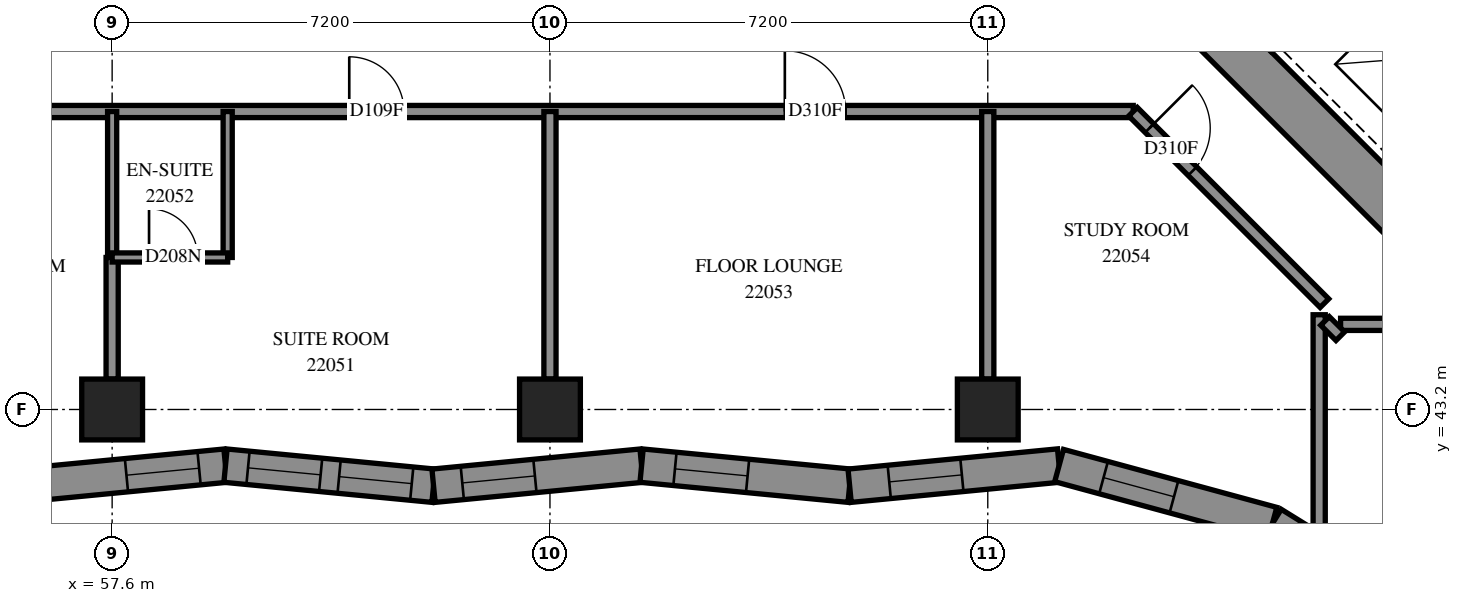
"""IFC4 building model, lengths in metres.
Left out: names, types, materials, properties, quantities, classifications, styles, units other than length and angle.
Written with IfcOpenShell. Run it as: python <this file> out.ifc"""

import sys

from ifc_helpers import new_model, si_unit, direction, frame, frame_2d, origin, origin_2d, place, context, subcontext, project, spatial, polyline, rectangle, outline, extrude, element, fill, save


model = new_model("IFC4")
c1 = context("Model", 3, precision=1e-05, world=origin(), true_north=direction((0.0, 1.0)))
c2 = subcontext(c1, "Body", "Model", "MODEL_VIEW")
j1 = project(units=[si_unit("LENGTHUNIT", "METRE"), si_unit("PLANEANGLEUNIT", "RADIAN")], contexts=[c1])
p1 = place(None, origin())
s1 = spatial("IfcSite", under=j1, at=p1, CompositionType="ELEMENT")
p2 = place(p1, origin())
s2 = spatial("IfcBuilding", under=s1, at=p2, CompositionType="ELEMENT")
p3 = place(p2, frame((0.0, 0.0, 84.6)))
s3 = spatial("IfcBuildingStorey", under=s2, at=p3, CompositionType="ELEMENT", Elevation=84.6)
for number, where, z_axis, x_axis in (
    (1, (57.6, 43.2, 0.0), (0.0, 0.0, 1.0), (1.0, 0.0, 0.0)),
    (2, (64.8, 43.2, 0.0), (0.0, 0.0, 1.0), (1.0, 0.0, 0.0)),
    (3, (72.0, 43.2, 0.0), (0.0, 0.0, 1.0), (1.0, 0.0, 0.0)),
):
    element("IfcColumn", number, at=place(p3, frame(where, z_axis=z_axis, x_axis=x_axis)), inside=s3, PredefinedType="COLUMN", context=c2, shape_type="SweptSolid", body=[
        extrude(rectangle(XDim=1.0, YDim=1.0, at=origin_2d()), origin(), (0.0, 0.0, 1.0), 3.1),
    ])
p4 = place(p3, frame((75.806, 49.373, -0.3), z_axis=(0.0, 0.0, 1.0), x_axis=(0.7071067812, -0.7071067812, 0.0)))
e4 = element("IfcWall", 4, at=p4, inside=s3, PredefinedType="SHEAR", context=c2, shape_type="SweptSolid", body=[
    extrude(rectangle(XDim=16.0, YDim=0.8, at=frame_2d((8.0, 0.0))), origin(), (0.0, 0.0, 1.0), 2.7),
])
p5 = place(p3, frame((56.043, 41.946, 0.0), z_axis=(0.0, 0.0, 1.0), x_axis=(0.995380467, 0.096008989, 0.0)))
e5 = element("IfcWall", 5, at=p5, inside=s3, PredefinedType="SOLIDWALL", context=c2, shape_type="SweptSolid", body=[
    extrude(outline(polyline([(-0.026, -0.275), (3.411, -0.275), (3.464, 0.275), (0.026, 0.275), (-0.026, -0.275)])), origin(), (0.0, 0.0, 1.0), 3.1),
])
p6 = place(p5, frame((1.801, 0.0, 0.5)))
e6 = element("IfcOpeningElement", 6, at=p6, cuts=e5, PredefinedType="OPENING", context=c2, shape_type="SweptSolid", body=[
    extrude(rectangle(XDim=1.2, YDim=2.45, at=frame_2d((0.6, 1.225))), frame((0.0, 0.285, 0.0), z_axis=(0.0, -1.0, 0.0), x_axis=(1.0, 0.0, 0.0)), (0.0, 0.0, 1.0), 0.57),
])
p7 = place(p3, frame((59.464, 42.276, 0.0), z_axis=(0.0, 0.0, 1.0), x_axis=(0.995380467, -0.096008989, 0.0)))
e7 = element("IfcWall", 7, at=p7, inside=s3, PredefinedType="SOLIDWALL", context=c2, shape_type="SweptSolid", body=[
    extrude(outline(polyline([(0.026, -0.275), (3.464, -0.275), (3.411, 0.275), (-0.026, 0.275), (0.026, -0.275)])), origin(), (0.0, 0.0, 1.0), 3.1),
])
p8 = place(p7, frame((0.372, 0.0, 0.5)))
e8 = element("IfcOpeningElement", 8, at=p8, cuts=e7, PredefinedType="OPENING", context=c2, shape_type="SweptSolid", body=[
    extrude(rectangle(XDim=1.2, YDim=2.45, at=frame_2d((0.6, 1.225))), frame((0.0, 0.285, 0.0), z_axis=(0.0, -1.0, 0.0), x_axis=(1.0, 0.0, 0.0)), (0.0, 0.0, 1.0), 0.57),
])
p9 = place(p7, frame((1.877, 0.0, 0.5)))
e9 = element("IfcOpeningElement", 9, at=p9, cuts=e7, PredefinedType="OPENING", context=c2, shape_type="SweptSolid", body=[
    extrude(rectangle(XDim=1.2, YDim=2.45, at=frame_2d((0.6, 1.225))), frame((0.0, 0.285, 0.0), z_axis=(0.0, -1.0, 0.0), x_axis=(1.0, 0.0, 0.0)), (0.0, 0.0, 1.0), 0.57),
])
p10 = place(p3, frame((62.885, 41.946, 0.0), z_axis=(0.0, 0.0, 1.0), x_axis=(0.9953807351, 0.0960062087, 0.0)))
e10 = element("IfcWall", 10, at=p10, inside=s3, PredefinedType="SOLIDWALL", context=c2, shape_type="SweptSolid", body=[
    extrude(outline(polyline([(-0.026, -0.275), (3.411, -0.275), (3.464, 0.275), (0.026, 0.275), (-0.026, -0.275)])), origin(), (0.0, 0.0, 1.0), 3.1),
])
p11 = place(p10, frame((0.475, 0.0, 0.5)))
e11 = element("IfcOpeningElement", 11, at=p11, cuts=e10, PredefinedType="OPENING", context=c2, shape_type="SweptSolid", body=[
    extrude(rectangle(XDim=1.2, YDim=2.45, at=frame_2d((0.6, 1.225))), frame((0.0, 0.285, 0.0), z_axis=(0.0, -1.0, 0.0), x_axis=(1.0, 0.0, 0.0)), (0.0, 0.0, 1.0), 0.57),
])
p12 = place(p3, frame((66.307, 42.276, 0.0), z_axis=(0.0, 0.0, 1.0), x_axis=(0.995380467, -0.096008989, 0.0)))
e12 = element("IfcWall", 12, at=p12, inside=s3, PredefinedType="SOLIDWALL", context=c2, shape_type="SweptSolid", body=[
    extrude(outline(polyline([(0.026, -0.275), (3.464, -0.275), (3.411, 0.275), (-0.026, 0.275), (0.026, -0.275)])), origin(), (0.0, 0.0, 1.0), 3.1),
])
p13 = place(p12, frame((0.551, 0.0, 0.5)))
e13 = element("IfcOpeningElement", 13, at=p13, cuts=e12, PredefinedType="OPENING", context=c2, shape_type="SweptSolid", body=[
    extrude(rectangle(XDim=1.2, YDim=2.45, at=frame_2d((0.6, 1.225))), frame((0.0, 0.285, 0.0), z_axis=(0.0, -1.0, 0.0), x_axis=(1.0, 0.0, 0.0)), (0.0, 0.0, 1.0), 0.57),
])
p14 = place(p3, frame((69.728, 41.946, 0.0), z_axis=(0.0, 0.0, 1.0), x_axis=(0.9953800797, 0.0960130045, 0.0)))
e14 = element("IfcWall", 14, at=p14, inside=s3, PredefinedType="SOLIDWALL", context=c2, shape_type="SweptSolid", body=[
    extrude(outline(polyline([(-0.026, -0.275), (3.411, -0.275), (3.511, 0.275), (0.026, 0.275), (-0.026, -0.275)])), origin(), (0.0, 0.0, 1.0), 3.1),
])
p15 = place(p14, frame((0.654, 0.0, 0.5)))
e15 = element("IfcOpeningElement", 15, at=p15, cuts=e14, PredefinedType="OPENING", context=c2, shape_type="SweptSolid", body=[
    extrude(rectangle(XDim=1.2, YDim=2.45, at=frame_2d((0.6, 1.225))), frame((0.0, 0.285, 0.0), z_axis=(0.0, -1.0, 0.0), x_axis=(1.0, 0.0, 0.0)), (0.0, 0.0, 1.0), 0.57),
])
p16 = place(p3, frame((73.173, 42.279, 0.0), z_axis=(0.0, 0.0, 1.0), x_axis=(0.9649824686, -0.2623143827, 0.0)))
e16 = element("IfcWall", 16, at=p16, inside=s3, PredefinedType="SOLIDWALL", context=c2, shape_type="SweptSolid", body=[
    extrude(outline(polyline([(0.05, -0.275), (3.596, -0.275), (3.676, 0.275), (-0.05, 0.275), (0.05, -0.275)])), origin(), (0.0, 0.0, 1.0), 3.1),
])
p17 = place(p16, frame((0.757, 0.0, 0.5)))
e17 = element("IfcOpeningElement", 17, at=p17, cuts=e16, PredefinedType="OPENING", context=c2, shape_type="SweptSolid", body=[
    extrude(rectangle(XDim=1.2, YDim=2.45, at=frame_2d((0.6, 1.225))), frame((0.0, 0.285, 0.0), z_axis=(0.0, -1.0, 0.0), x_axis=(1.0, 0.0, 0.0)), (0.0, 0.0, 1.0), 0.57),
])
p18 = place(p3, frame((76.681, 41.325, 0.0), z_axis=(0.0, 0.0, 1.0), x_axis=(0.8503819746, -0.5261658458, 0.0)))
e18 = element("IfcWall", 18, at=p18, inside=s3, PredefinedType="SOLIDWALL", context=c2, shape_type="SweptSolid", body=[
    extrude(outline(polyline([(0.04, -0.275), (4.097, -0.275), (4.184, 0.275), (-0.04, 0.275), (0.04, -0.275)])), origin(), (0.0, 0.0, 1.0), 3.1),
])
p19 = place(p18, frame((0.368, 0.0, 0.5)))
e19 = element("IfcOpeningElement", 19, at=p19, cuts=e18, PredefinedType="OPENING", context=c2, shape_type="SweptSolid", body=[
    extrude(rectangle(XDim=1.2, YDim=2.45, at=frame_2d((0.6, 1.225))), frame((0.0, 0.285, 0.0), z_axis=(0.0, -1.0, 0.0), x_axis=(1.0, 0.0, 0.0)), (0.0, 0.0, 1.0), 0.57),
])
p20 = place(p18, frame((2.238, 0.0, 0.5)))
e20 = element("IfcOpeningElement", 20, at=p20, cuts=e18, PredefinedType="OPENING", context=c2, shape_type="SweptSolid", body=[
    extrude(rectangle(XDim=1.2, YDim=2.45, at=frame_2d((0.6, 1.225))), frame((0.0, 0.285, 0.0), z_axis=(0.0, -1.0, 0.0), x_axis=(1.0, 0.0, 0.0)), (0.0, 0.0, 1.0), 0.57),
])
p21 = place(p3, frame((55.3, 48.1, 0.0), z_axis=(0.0, 0.0, 1.0), x_axis=(1.0, 0.0, 0.0)))
e21 = element("IfcWall", 21, at=p21, inside=s3, PredefinedType="PARTITIONING", context=c2, shape_type="SweptSolid", body=[
    extrude(rectangle(XDim=19.092, YDim=0.2, at=frame_2d((9.546, 0.0))), origin(), (0.0, 0.0, 1.0), 3.1),
])
p22 = place(p21, frame((6.199, 0.0, 0.0)))
e22 = element("IfcOpeningElement", 22, at=p22, cuts=e21, PredefinedType="OPENING", context=c2, shape_type="SweptSolid", body=[
    extrude(rectangle(XDim=0.9, YDim=2.1, at=frame_2d((0.45, 1.05))), frame((0.0, 0.11, 0.0), z_axis=(0.0, -1.0, 0.0), x_axis=(1.0, 0.0, 0.0)), (0.0, 0.0, 1.0), 0.22),
])
p23 = place(p21, frame((13.363, 0.0, 0.0)))
e23 = element("IfcOpeningElement", 23, at=p23, cuts=e21, PredefinedType="OPENING", context=c2, shape_type="SweptSolid", body=[
    extrude(rectangle(XDim=1.0, YDim=2.1, at=frame_2d((0.5, 1.05))), frame((0.0, 0.11, 0.0), z_axis=(0.0, -1.0, 0.0), x_axis=(1.0, 0.0, 0.0)), (0.0, 0.0, 1.0), 0.22),
])
p24 = place(p3, frame((74.388, 48.096, 0.0), z_axis=(0.0, 0.0, 1.0), x_axis=(0.7071067812, -0.7071067812, 0.0)))
e24 = element("IfcWall", 24, at=p24, inside=s3, PredefinedType="PARTITIONING", context=c2, shape_type="SweptSolid", body=[
    extrude(rectangle(XDim=4.452, YDim=0.2, at=frame_2d((2.226, 0.0))), origin(), (0.0, 0.0, 1.0), 3.1),
])
p25 = place(p24, frame((0.382, 0.0, 0.0)))
e25 = element("IfcOpeningElement", 25, at=p25, cuts=e24, PredefinedType="OPENING", context=c2, shape_type="SweptSolid", body=[
    extrude(rectangle(XDim=1.0, YDim=2.1, at=frame_2d((0.5, 1.05))), frame((0.0, 0.11, 0.0), z_axis=(0.0, -1.0, 0.0), x_axis=(1.0, 0.0, 0.0)), (0.0, 0.0, 1.0), 0.22),
])
for number, where, z_axis, x_axis in (
    (26, (64.8, 43.7, 0.0), (0.0, 0.0, 1.0), (0.0, 1.0, 0.0)),
    (27, (72.0, 43.7, 0.0), (0.0, 0.0, 1.0), (0.0, 1.0, 0.0)),
):
    element("IfcWall", number, at=place(p3, frame(where, z_axis=z_axis, x_axis=x_axis)), inside=s3, PredefinedType="PARTITIONING", context=c2, shape_type="SweptSolid", body=[
        extrude(rectangle(XDim=4.4, YDim=0.2, at=frame_2d((2.2, 0.0))), origin(), (0.0, 0.0, 1.0), 3.1),
    ])
p26 = place(p3, frame((77.45, 41.173, 0.0), z_axis=(0.0, 0.0, 1.0), x_axis=(0.0, 1.0, 0.0)))
e28 = element("IfcWall", 28, at=p26, inside=s3, PredefinedType="PARTITIONING", context=c2, shape_type="SweptSolid", body=[
    extrude(rectangle(XDim=3.585, YDim=0.2, at=frame_2d((1.793, 0.0))), origin(), (0.0, 0.0, 1.0), 3.1),
])
for number, where, z_axis, x_axis in (
    (29, (59.5, 45.7, 0.0), (0.0, 0.0, 1.0), (0.0, 1.0, 0.0)),
    (30, (57.6, 45.7, 0.0), (0.0, 0.0, 1.0), (0.0, 1.0, 0.0)),
):
    element("IfcWall", number, at=place(p3, frame(where, z_axis=z_axis, x_axis=x_axis)), inside=s3, PredefinedType="PARTITIONING", context=c2, shape_type="SweptSolid", body=[
        extrude(rectangle(XDim=2.4, YDim=0.15, at=frame_2d((1.2, 0.0))), origin(), (0.0, 0.0, 1.0), 3.1),
    ])
p27 = place(p3, frame((77.802, 44.6, 0.0), z_axis=(0.0, 0.0, 1.0), x_axis=(1.0, 0.0, 0.0)))
e31 = element("IfcWall", 31, at=p27, inside=s3, PredefinedType="PARTITIONING", context=c2, shape_type="SweptSolid", body=[
    extrude(rectangle(XDim=2.098, YDim=0.2, at=frame_2d((1.049, 0.0))), origin(), (0.0, 0.0, 1.0), 3.1),
])
p28 = place(p3, frame((57.6, 43.7, 0.0), z_axis=(0.0, 0.0, 1.0), x_axis=(0.0, 1.0, 0.0)))
e32 = element("IfcWall", 32, at=p28, inside=s3, PredefinedType="PARTITIONING", context=c2, shape_type="SweptSolid", body=[
    extrude(rectangle(XDim=2.0, YDim=0.2, at=frame_2d((1.0, 0.0))), origin(), (0.0, 0.0, 1.0), 3.1),
])
p29 = place(p3, frame((57.6, 45.7, 0.0), z_axis=(0.0, 0.0, 1.0), x_axis=(1.0, 0.0, 0.0)))
e33 = element("IfcWall", 33, at=p29, inside=s3, PredefinedType="PARTITIONING", context=c2, shape_type="SweptSolid", body=[
    extrude(rectangle(XDim=1.9, YDim=0.15, at=frame_2d((0.95, 0.0))), origin(), (0.0, 0.0, 1.0), 3.1),
])
p30 = place(p29, frame((0.607, 0.0, 0.0)))
e34 = element("IfcOpeningElement", 34, at=p30, cuts=e33, PredefinedType="OPENING", context=c2, shape_type="SweptSolid", body=[
    extrude(rectangle(XDim=0.8, YDim=2.1, at=frame_2d((0.4, 1.05))), frame((0.0, 0.085, 0.0), z_axis=(0.0, -1.0, 0.0), x_axis=(1.0, 0.0, 0.0)), (0.0, 0.0, 1.0), 0.17),
])
p31 = place(p3, frame((78.357, 40.612, 0.0), z_axis=(0.0, 0.0, 1.0), x_axis=(0.7071489323, 0.7070646275, 0.0)))
e35 = element("IfcWall", 35, at=p31, inside=s3, PredefinedType="PARTITIONING", context=c2, shape_type="SweptSolid", body=[
    extrude(rectangle(XDim=1.186, YDim=0.2, at=frame_2d((0.593, 0.0))), origin(), (0.0, 0.0, 1.0), 3.1),
])
p32 = place(p3, frame((77.546, 44.656, 0.0), z_axis=(0.0, 0.0, 1.0), x_axis=(0.7071067812, -0.7071067812, 0.0)))
e36 = element("IfcWall", 36, at=p32, inside=s3, PredefinedType="PARTITIONING", context=c2, shape_type="SweptSolid", body=[
    extrude(rectangle(XDim=0.355, YDim=0.2, at=frame_2d((0.177, 0.0))), origin(), (0.0, 0.0, 1.0), 3.1),
])
p33 = place(p6, origin())
e37 = element("IfcWindow", 37, at=p33, inside=s3, PartitioningType="SINGLE_PANEL", PredefinedType="WINDOW", context=c2, shape_type="SweptSolid", body=[
    extrude(rectangle(XDim=1.2, YDim=2.45, at=frame_2d((0.6, 1.225))), frame((0.0, 0.155, 0.0), z_axis=(0.0, -1.0, 0.0), x_axis=(1.0, 0.0, 0.0)), (0.0, 0.0, 1.0), 0.06),
])
fill(e6, e37)
p34 = place(p8, origin())
e38 = element("IfcWindow", 38, at=p34, inside=s3, PartitioningType="SINGLE_PANEL", PredefinedType="WINDOW", context=c2, shape_type="SweptSolid", body=[
    extrude(rectangle(XDim=1.2, YDim=2.45, at=frame_2d((0.6, 1.225))), frame((0.0, 0.155, 0.0), z_axis=(0.0, -1.0, 0.0), x_axis=(1.0, 0.0, 0.0)), (0.0, 0.0, 1.0), 0.06),
])
fill(e8, e38)
p35 = place(p9, origin())
e39 = element("IfcWindow", 39, at=p35, inside=s3, PartitioningType="SINGLE_PANEL", PredefinedType="WINDOW", context=c2, shape_type="SweptSolid", body=[
    extrude(rectangle(XDim=1.2, YDim=2.45, at=frame_2d((0.6, 1.225))), frame((0.0, 0.155, 0.0), z_axis=(0.0, -1.0, 0.0), x_axis=(1.0, 0.0, 0.0)), (0.0, 0.0, 1.0), 0.06),
])
fill(e9, e39)
p36 = place(p11, origin())
e40 = element("IfcWindow", 40, at=p36, inside=s3, PartitioningType="SINGLE_PANEL", PredefinedType="WINDOW", context=c2, shape_type="SweptSolid", body=[
    extrude(rectangle(XDim=1.2, YDim=2.45, at=frame_2d((0.6, 1.225))), frame((0.0, 0.155, 0.0), z_axis=(0.0, -1.0, 0.0), x_axis=(1.0, 0.0, 0.0)), (0.0, 0.0, 1.0), 0.06),
])
fill(e11, e40)
p37 = place(p13, origin())
e41 = element("IfcWindow", 41, at=p37, inside=s3, PartitioningType="SINGLE_PANEL", PredefinedType="WINDOW", context=c2, shape_type="SweptSolid", body=[
    extrude(rectangle(XDim=1.2, YDim=2.45, at=frame_2d((0.6, 1.225))), frame((0.0, 0.155, 0.0), z_axis=(0.0, -1.0, 0.0), x_axis=(1.0, 0.0, 0.0)), (0.0, 0.0, 1.0), 0.06),
])
fill(e13, e41)
p38 = place(p15, origin())
e42 = element("IfcWindow", 42, at=p38, inside=s3, PartitioningType="SINGLE_PANEL", PredefinedType="WINDOW", context=c2, shape_type="SweptSolid", body=[
    extrude(rectangle(XDim=1.2, YDim=2.45, at=frame_2d((0.6, 1.225))), frame((0.0, 0.155, 0.0), z_axis=(0.0, -1.0, 0.0), x_axis=(1.0, 0.0, 0.0)), (0.0, 0.0, 1.0), 0.06),
])
fill(e15, e42)
p39 = place(p17, origin())
e43 = element("IfcWindow", 43, at=p39, inside=s3, PartitioningType="SINGLE_PANEL", PredefinedType="WINDOW", context=c2, shape_type="SweptSolid", body=[
    extrude(rectangle(XDim=1.2, YDim=2.45, at=frame_2d((0.6, 1.225))), frame((0.0, 0.155, 0.0), z_axis=(0.0, -1.0, 0.0), x_axis=(1.0, 0.0, 0.0)), (0.0, 0.0, 1.0), 0.06),
])
fill(e17, e43)
p40 = place(p22, origin())
e44 = element("IfcDoor", 44, at=p40, inside=s3, OperationType="SINGLE_SWING_LEFT", PredefinedType="DOOR", context=c2, shape_type="SweptSolid", body=[
    extrude(rectangle(XDim=0.9, YDim=2.1, at=frame_2d((0.45, 1.05))), frame((0.0, 0.025, 0.0), z_axis=(0.0, -1.0, 0.0), x_axis=(1.0, 0.0, 0.0)), (0.0, 0.0, 1.0), 0.05),
])
fill(e22, e44)
p41 = place(p30, origin())
e45 = element("IfcDoor", 45, at=p41, inside=s3, OperationType="SINGLE_SWING_RIGHT", PredefinedType="DOOR", context=c2, shape_type="SweptSolid", body=[
    extrude(rectangle(XDim=0.8, YDim=2.1, at=frame_2d((0.4, 1.05))), frame((0.0, 0.025, 0.0), z_axis=(0.0, -1.0, 0.0), x_axis=(1.0, 0.0, 0.0)), (0.0, 0.0, 1.0), 0.05),
])
fill(e34, e45)
p42 = place(p23, origin())
e46 = element("IfcDoor", 46, at=p42, inside=s3, OperationType="SINGLE_SWING_LEFT", PredefinedType="DOOR", context=c2, shape_type="SweptSolid", body=[
    extrude(rectangle(XDim=1.0, YDim=2.1, at=frame_2d((0.5, 1.05))), frame((0.0, 0.025, 0.0), z_axis=(0.0, -1.0, 0.0), x_axis=(1.0, 0.0, 0.0)), (0.0, 0.0, 1.0), 0.05),
])
fill(e23, e46)
p43 = place(p25, origin())
e47 = element("IfcDoor", 47, at=p43, inside=s3, OperationType="SINGLE_SWING_LEFT", PredefinedType="DOOR", context=c2, shape_type="SweptSolid", body=[
    extrude(rectangle(XDim=1.0, YDim=2.1, at=frame_2d((0.5, 1.05))), frame((0.0, 0.025, 0.0), z_axis=(0.0, -1.0, 0.0), x_axis=(1.0, 0.0, 0.0)), (0.0, 0.0, 1.0), 0.05),
])
fill(e25, e47)
save(model, sys.argv[1])
